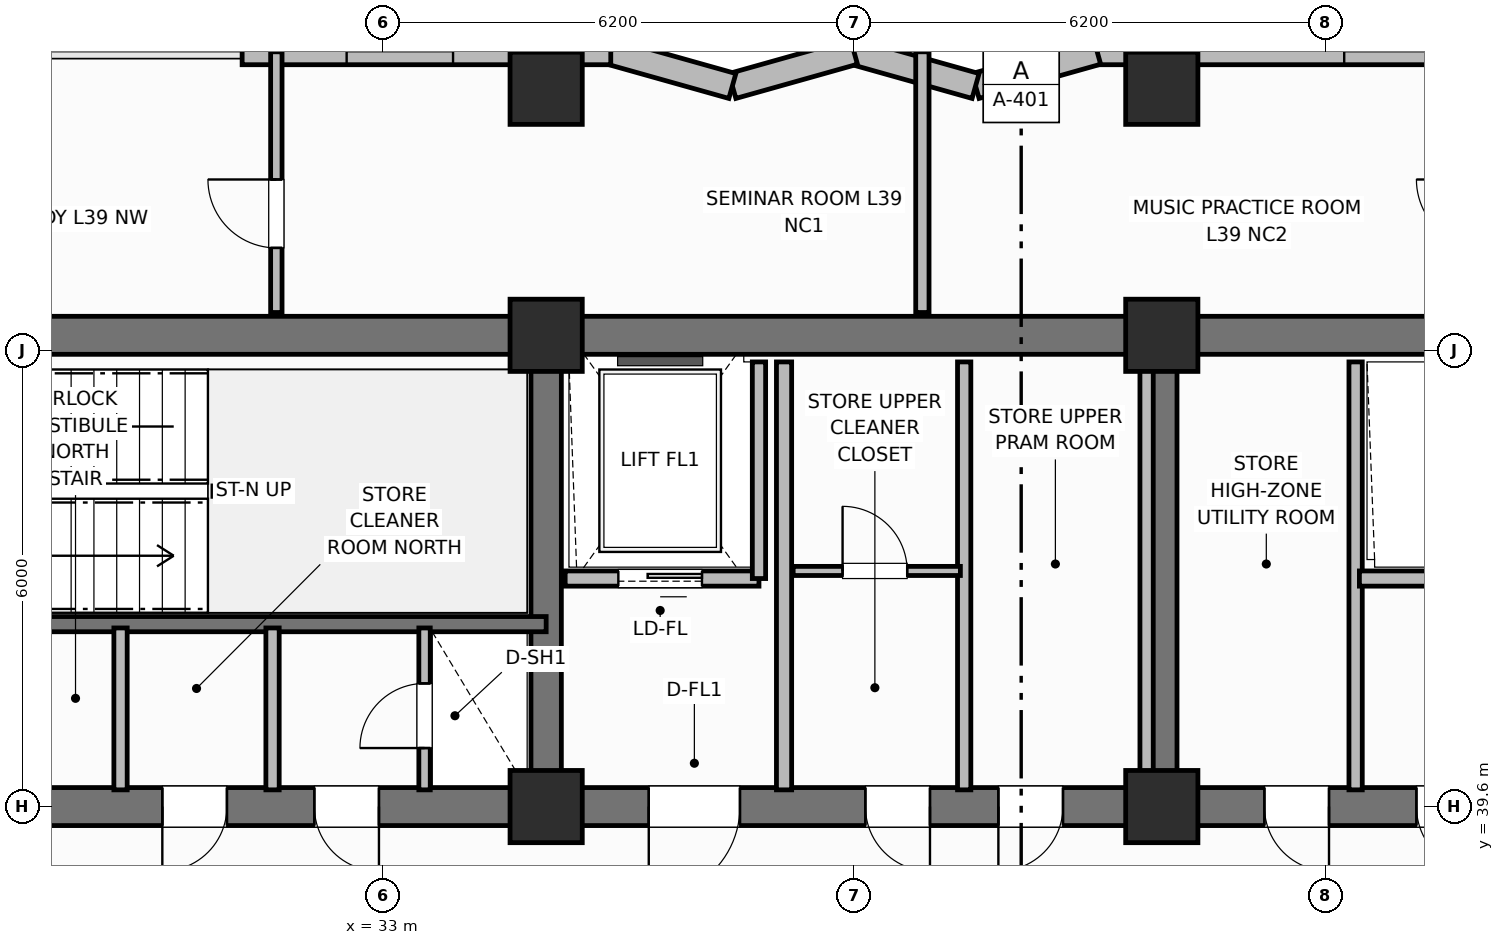
"""IFC4 building model, lengths in metres.
Left out: names, types, materials, properties, quantities, classifications, styles, units other than length and angle.
Written with IfcOpenShell. Run it as: python <this file> out.ifc"""

import sys

from ifc_helpers import new_model, si_unit, direction, frame, frame_2d, origin, origin_2d, place, context, subcontext, project, spatial, rectangle, extrude, element, fill, save


model = new_model("IFC4")
c1 = context("Model", 3, precision=1e-05, world=origin(), true_north=direction((0.0, 1.0)))
c2 = subcontext(c1, "Body", "Model", "MODEL_VIEW")
j1 = project(units=[si_unit("LENGTHUNIT", "METRE"), si_unit("PLANEANGLEUNIT", "RADIAN")], contexts=[c1])
p1 = place(None, origin())
s1 = spatial("IfcSite", under=j1, at=p1, CompositionType="ELEMENT")
p2 = place(p1, origin())
s2 = spatial("IfcBuilding", under=s1, at=p2, CompositionType="ELEMENT")
p3 = place(p2, frame((0.0, 0.0, 158.9)))
s3 = spatial("IfcBuildingStorey", under=s2, at=p3, CompositionType="ELEMENT", Elevation=158.9)
p4 = place(p3, frame((25.6, 45.8, 0.0), z_axis=(0.0, 0.0, 1.0), x_axis=(1.0, 0.0, 0.0)))
e1 = element("IfcWall", 1, at=p4, inside=s3, PredefinedType="SHEAR", context=c2, shape_type="SweptSolid", body=[
    extrude(rectangle(XDim=27.2, YDim=0.5, at=frame_2d((13.6, 0.0))), origin(), (0.0, 0.0, 1.0), 3.7),
])
p5 = place(p3, frame((52.8, 39.6, 0.0), z_axis=(0.0, 0.0, 1.0), x_axis=(-1.0, 0.0, 0.0)))
e2 = element("IfcWall", 2, at=p5, inside=s3, PredefinedType="SHEAR", context=c2, shape_type="SweptSolid", body=[
    extrude(rectangle(XDim=27.2, YDim=0.5, at=frame_2d((13.6, 0.0))), origin(), (0.0, 0.0, 1.0), 3.7),
])
p6 = place(p5, frame((24.3, 0.0, 0.0)))
e3 = element("IfcOpeningElement", 3, at=p6, cuts=e2, PredefinedType="OPENING", context=c2, shape_type="SweptSolid", body=[
    extrude(rectangle(XDim=1.1, YDim=2.15, at=frame_2d((0.55, 1.075))), frame((0.0, 0.26, 0.0), z_axis=(0.0, -1.0, 0.0), x_axis=(1.0, 0.0, 0.0)), (0.0, 0.0, 1.0), 0.52),
])
p7 = place(p5, frame((21.85, 0.0, 0.0)))
e4 = element("IfcOpeningElement", 4, at=p7, cuts=e2, PredefinedType="OPENING", context=c2, shape_type="SweptSolid", body=[
    extrude(rectangle(XDim=0.85, YDim=2.1, at=frame_2d((0.425, 1.05))), frame((0.0, 0.26, 0.0), z_axis=(0.0, -1.0, 0.0), x_axis=(1.0, 0.0, 0.0)), (0.0, 0.0, 1.0), 0.52),
])
p8 = place(p5, frame((19.85, 0.0, 0.0)))
e5 = element("IfcOpeningElement", 5, at=p8, cuts=e2, PredefinedType="OPENING", context=c2, shape_type="SweptSolid", body=[
    extrude(rectangle(XDim=0.85, YDim=2.1, at=frame_2d((0.425, 1.05))), frame((0.0, 0.26, 0.0), z_axis=(0.0, -1.0, 0.0), x_axis=(1.0, 0.0, 0.0)), (0.0, 0.0, 1.0), 0.52),
])
p9 = place(p5, frame((15.1, 0.0, 0.0)))
e6 = element("IfcOpeningElement", 6, at=p9, cuts=e2, PredefinedType="OPENING", context=c2, shape_type="SweptSolid", body=[
    extrude(rectangle(XDim=1.2, YDim=2.15, at=frame_2d((0.6, 1.075))), frame((0.0, 0.26, 0.0), z_axis=(0.0, -1.0, 0.0), x_axis=(1.0, 0.0, 0.0)), (0.0, 0.0, 1.0), 0.52),
])
p10 = place(p5, frame((12.6, 0.0, 0.0)))
e7 = element("IfcOpeningElement", 7, at=p10, cuts=e2, PredefinedType="OPENING", context=c2, shape_type="SweptSolid", body=[
    extrude(rectangle(XDim=0.85, YDim=2.1, at=frame_2d((0.425, 1.05))), frame((0.0, 0.26, 0.0), z_axis=(0.0, -1.0, 0.0), x_axis=(1.0, 0.0, 0.0)), (0.0, 0.0, 1.0), 0.52),
])
p11 = place(p5, frame((10.85, 0.0, 0.0)))
e8 = element("IfcOpeningElement", 8, at=p11, cuts=e2, PredefinedType="OPENING", context=c2, shape_type="SweptSolid", body=[
    extrude(rectangle(XDim=0.85, YDim=2.1, at=frame_2d((0.425, 1.05))), frame((0.0, 0.26, 0.0), z_axis=(0.0, -1.0, 0.0), x_axis=(1.0, 0.0, 0.0)), (0.0, 0.0, 1.0), 0.52),
])
p12 = place(p5, frame((7.35, 0.0, 0.0)))
e9 = element("IfcOpeningElement", 9, at=p12, cuts=e2, PredefinedType="OPENING", context=c2, shape_type="SweptSolid", body=[
    extrude(rectangle(XDim=0.85, YDim=2.1, at=frame_2d((0.425, 1.05))), frame((0.0, 0.26, 0.0), z_axis=(0.0, -1.0, 0.0), x_axis=(1.0, 0.0, 0.0)), (0.0, 0.0, 1.0), 0.52),
])
p13 = place(p5, frame((5.35, 0.0, 0.0)))
e10 = element("IfcOpeningElement", 10, at=p13, cuts=e2, PredefinedType="OPENING", context=c2, shape_type="SweptSolid", body=[
    extrude(rectangle(XDim=0.85, YDim=2.1, at=frame_2d((0.425, 1.05))), frame((0.0, 0.26, 0.0), z_axis=(0.0, -1.0, 0.0), x_axis=(1.0, 0.0, 0.0)), (0.0, 0.0, 1.0), 0.52),
])
p14 = place(p5, frame((2.0, 0.0, 0.0)))
e11 = element("IfcOpeningElement", 11, at=p14, cuts=e2, PredefinedType="OPENING", context=c2, shape_type="SweptSolid", body=[
    extrude(rectangle(XDim=0.85, YDim=2.1, at=frame_2d((0.425, 1.05))), frame((0.0, 0.26, 0.0), z_axis=(0.0, -1.0, 0.0), x_axis=(1.0, 0.0, 0.0)), (0.0, 0.0, 1.0), 0.52),
])
for number, where, z_axis, x_axis in (
    (12, (35.15, 39.85, 0.0), (0.0, 0.0, 1.0), (0.0, 1.0, 0.0)),
    (13, (43.25, 39.85, 0.0), (0.0, 0.0, 1.0), (0.0, 1.0, 0.0)),
):
    element("IfcWall", number, at=place(p3, frame(where, z_axis=z_axis, x_axis=x_axis)), inside=s3, PredefinedType="SHEAR", context=c2, shape_type="SweptSolid", body=[
        extrude(rectangle(XDim=5.7, YDim=0.4, at=frame_2d((2.85, 0.0))), origin(), (0.0, 0.0, 1.0), 3.7),
    ])
for number, where, z_axis, x_axis in (
    (14, (35.15, 39.6, 0.0), (0.0, 0.0, 1.0), (1.0, 0.0, 0.0)),
    (15, (35.15, 45.8, 0.0), (0.0, 0.0, 1.0), (1.0, 0.0, 0.0)),
    (16, (43.25, 39.6, 0.0), (0.0, 0.0, 1.0), (1.0, 0.0, 0.0)),
    (17, (43.25, 45.8, 0.0), (0.0, 0.0, 1.0), (1.0, 0.0, 0.0)),
    (18, (35.15, 49.05, 0.0), (0.0, 0.0, 1.0), (1.0, 0.0, 0.0)),
    (19, (43.25, 49.05, 0.0), (0.0, 0.0, 1.0), (1.0, 0.0, 0.0)),
):
    element("IfcColumn", number, at=place(p3, frame(where, z_axis=z_axis, x_axis=x_axis)), inside=s3, PredefinedType="COLUMN", context=c2, shape_type="SweptSolid", body=[
        extrude(rectangle(XDim=0.95, YDim=0.95, at=origin_2d()), origin(), (0.0, 0.0, 1.0), 3.7),
    ])
p15 = place(p3, frame((58.2, 49.53, 0.0), z_axis=(0.0, 0.0, 1.0), x_axis=(-1.0, 0.0, 0.0)))
e20 = element("IfcWall", 20, at=p15, inside=s3, PredefinedType="SOLIDWALL", context=c2, shape_type="SweptSolid", body=[
    extrude(rectangle(XDim=15.8, YDim=0.34, at=frame_2d((7.9, 0.0))), origin(), (0.0, 0.0, 1.0), 2.72),
])
p16 = place(p15, frame((1.4, 0.0, 0.75)))
e21 = element("IfcOpeningElement", 21, at=p16, cuts=e20, PredefinedType="OPENING", context=c2, shape_type="SweptSolid", body=[
    extrude(rectangle(XDim=1.4, YDim=1.85, at=frame_2d((0.7, 0.925))), frame((0.0, 0.18, 0.0), z_axis=(0.0, -1.0, 0.0), x_axis=(1.0, 0.0, 0.0)), (0.0, 0.0, 1.0), 0.36),
])
p17 = place(p15, frame((7.2, 0.0, 0.75)))
e22 = element("IfcOpeningElement", 22, at=p17, cuts=e20, PredefinedType="OPENING", context=c2, shape_type="SweptSolid", body=[
    extrude(rectangle(XDim=1.4, YDim=1.85, at=frame_2d((0.7, 0.925))), frame((0.0, 0.18, 0.0), z_axis=(0.0, -1.0, 0.0), x_axis=(1.0, 0.0, 0.0)), (0.0, 0.0, 1.0), 0.36),
])
p18 = place(p15, frame((11.15, 0.0, 0.75)))
e23 = element("IfcOpeningElement", 23, at=p18, cuts=e20, PredefinedType="OPENING", context=c2, shape_type="SweptSolid", body=[
    extrude(rectangle(XDim=1.4, YDim=1.85, at=frame_2d((0.7, 0.925))), frame((0.0, 0.18, 0.0), z_axis=(0.0, -1.0, 0.0), x_axis=(1.0, 0.0, 0.0)), (0.0, 0.0, 1.0), 0.36),
])
p19 = place(p3, frame((42.4, 49.53, 0.0), z_axis=(0.0, 0.0, 1.0), x_axis=(-0.962652136636, -0.270741322725, 0.0)))
e24 = element("IfcWall", 24, at=p19, inside=s3, PredefinedType="SOLIDWALL", context=c2, shape_type="SweptSolid", body=[
    extrude(rectangle(XDim=1.662, YDim=0.34, at=frame_2d((0.831, 0.0))), origin(), (0.0, 0.0, 1.0), 2.72),
])
p20 = place(p3, frame((40.8, 49.08, 0.0), z_axis=(0.0, 0.0, 1.0), x_axis=(-0.962662902433, 0.270703040766, 0.0)))
e25 = element("IfcWall", 25, at=p20, inside=s3, PredefinedType="SOLIDWALL", context=c2, shape_type="SweptSolid", body=[
    extrude(rectangle(XDim=1.662, YDim=0.34, at=frame_2d((0.831, 0.0))), origin(), (0.0, 0.0, 1.0), 2.72),
])
p21 = place(p3, frame((39.2, 49.53, 0.0), z_axis=(0.0, 0.0, 1.0), x_axis=(-0.962652136636, -0.270741322725, 0.0)))
e26 = element("IfcWall", 26, at=p21, inside=s3, PredefinedType="SOLIDWALL", context=c2, shape_type="SweptSolid", body=[
    extrude(rectangle(XDim=1.662, YDim=0.34, at=frame_2d((0.831, 0.0))), origin(), (0.0, 0.0, 1.0), 2.72),
])
p22 = place(p3, frame((37.6, 49.08, 0.0), z_axis=(0.0, 0.0, 1.0), x_axis=(-0.962662902433, 0.270703040766, 0.0)))
e27 = element("IfcWall", 27, at=p22, inside=s3, PredefinedType="SOLIDWALL", context=c2, shape_type="SweptSolid", body=[
    extrude(rectangle(XDim=1.662, YDim=0.34, at=frame_2d((0.831, 0.0))), origin(), (0.0, 0.0, 1.0), 2.72),
])
p23 = place(p3, frame((36.0, 49.53, 0.0), z_axis=(0.0, 0.0, 1.0), x_axis=(-1.0, 0.0, 0.0)))
e28 = element("IfcWall", 28, at=p23, inside=s3, PredefinedType="SOLIDWALL", context=c2, shape_type="SweptSolid", body=[
    extrude(rectangle(XDim=4.85, YDim=0.34, at=frame_2d((2.425, 0.0))), origin(), (0.0, 0.0, 1.0), 2.72),
])
p24 = place(p23, frame((2.075, 0.0, 0.75)))
e29 = element("IfcOpeningElement", 29, at=p24, cuts=e28, PredefinedType="OPENING", context=c2, shape_type="SweptSolid", body=[
    extrude(rectangle(XDim=1.4, YDim=1.85, at=frame_2d((0.7, 0.925))), frame((0.0, 0.18, 0.0), z_axis=(0.0, -1.0, 0.0), x_axis=(1.0, 0.0, 0.0)), (0.0, 0.0, 1.0), 0.36),
])
p25 = place(p3, frame((35.15, 42.0, 0.0), z_axis=(0.0, 0.0, 1.0), x_axis=(-1.0, 0.0, 0.0)))
e30 = element("IfcWall", 30, at=p25, inside=s3, PredefinedType="SHEAR", context=c2, shape_type="SweptSolid", body=[
    extrude(rectangle(XDim=9.55, YDim=0.2, at=frame_2d((4.775, 0.0))), origin(), (0.0, 0.0, 1.0), 3.7),
])
p26 = place(p25, frame((7.25, 0.0, 0.0)))
e31 = element("IfcOpeningElement", 31, at=p26, cuts=e30, PredefinedType="OPENING", context=c2, shape_type="SweptSolid", body=[
    extrude(rectangle(XDim=1.1, YDim=2.15, at=frame_2d((0.55, 1.075))), frame((0.0, 0.11, 0.0), z_axis=(0.0, -1.0, 0.0), x_axis=(1.0, 0.0, 0.0)), (0.0, 0.0, 1.0), 0.22),
])
p27 = place(p3, frame((33.55, 39.82, 0.0), z_axis=(0.0, 0.0, 1.0), x_axis=(0.0, 1.0, 0.0)))
e32 = element("IfcWall", 32, at=p27, inside=s3, PredefinedType="PARTITIONING", context=c2, shape_type="SweptSolid", body=[
    extrude(rectangle(XDim=2.13, YDim=0.15, at=frame_2d((1.065, 0.0))), origin(), (0.0, 0.0, 1.0), 2.55),
])
p28 = place(p27, frame((0.55, 0.0, 0.0)))
e33 = element("IfcOpeningElement", 33, at=p28, cuts=e32, PredefinedType="OPENING", context=c2, shape_type="SweptSolid", body=[
    extrude(rectangle(XDim=0.85, YDim=2.05, at=frame_2d((0.425, 1.025))), frame((0.0, 0.085, 0.0), z_axis=(0.0, -1.0, 0.0), x_axis=(1.0, 0.0, 0.0)), (0.0, 0.0, 1.0), 0.17),
])
for number, where, z_axis, x_axis in (
    (34, (29.55, 39.82, 0.0), (0.0, 0.0, 1.0), (0.0, 1.0, 0.0)),
    (35, (31.55, 39.82, 0.0), (0.0, 0.0, 1.0), (0.0, 1.0, 0.0)),
):
    element("IfcWall", number, at=place(p3, frame(where, z_axis=z_axis, x_axis=x_axis)), inside=s3, PredefinedType="PARTITIONING", context=c2, shape_type="SweptSolid", body=[
        extrude(rectangle(XDim=2.13, YDim=0.175, at=frame_2d((1.065, 0.0))), origin(), (0.0, 0.0, 1.0), 2.55),
    ])
p29 = place(p3, frame((37.95, 42.6, 0.0), z_axis=(0.0, 0.0, 1.0), x_axis=(-1.0, 0.0, 0.0)))
e36 = element("IfcWall", 36, at=p29, inside=s3, PredefinedType="PARTITIONING", context=c2, shape_type="SweptSolid", body=[
    extrude(rectangle(XDim=2.55, YDim=0.2, at=frame_2d((1.275, 0.0))), origin(), (0.0, 0.0, 1.0), 2.32),
])
p30 = place(p29, frame((0.75, 0.0, 0.0)))
e37 = element("IfcOpeningElement", 37, at=p30, cuts=e36, PredefinedType="OPENING", context=c2, shape_type="SweptSolid", body=[
    extrude(rectangle(XDim=1.1, YDim=2.15, at=frame_2d((0.55, 1.075))), frame((0.0, 0.11, 0.0), z_axis=(0.0, -1.0, 0.0), x_axis=(1.0, 0.0, 0.0)), (0.0, 0.0, 1.0), 0.22),
])
p31 = place(p3, frame((37.95, 42.6, 0.0), z_axis=(0.0, 0.0, 1.0), x_axis=(0.0, 1.0, 0.0)))
e38 = element("IfcWall", 38, at=p31, inside=s3, PredefinedType="PARTITIONING", context=c2, shape_type="SweptSolid", body=[
    extrude(rectangle(XDim=2.85, YDim=0.175, at=frame_2d((1.425, 0.0))), origin(), (0.0, 0.0, 1.0), 2.55),
])
p32 = place(p3, frame((38.28, 39.82, 0.0), z_axis=(0.0, 0.0, 1.0), x_axis=(0.0, 1.0, 0.0)))
e39 = element("IfcWall", 39, at=p32, inside=s3, PredefinedType="PARTITIONING", context=c2, shape_type="SweptSolid", body=[
    extrude(rectangle(XDim=5.63, YDim=0.2, at=frame_2d((2.815, 0.0))), origin(), (0.0, 0.0, 1.0), 2.55),
])
for number, where, z_axis, x_axis in (
    (40, (43.05, 39.82, 0.0), (0.0, 0.0, 1.0), (0.0, 1.0, 0.0)),
    (41, (40.65, 39.82, 0.0), (0.0, 0.0, 1.0), (0.0, 1.0, 0.0)),
):
    element("IfcWall", number, at=place(p3, frame(where, z_axis=z_axis, x_axis=x_axis)), inside=s3, PredefinedType="PARTITIONING", context=c2, shape_type="SweptSolid", body=[
        extrude(rectangle(XDim=5.63, YDim=0.175, at=frame_2d((2.815, 0.0))), origin(), (0.0, 0.0, 1.0), 2.55),
    ])
p33 = place(p3, frame((38.4, 42.7, 0.0), z_axis=(0.0, 0.0, 1.0), x_axis=(1.0, 0.0, 0.0)))
e42 = element("IfcWall", 42, at=p33, inside=s3, PredefinedType="PARTITIONING", context=c2, shape_type="SweptSolid", body=[
    extrude(rectangle(XDim=2.2, YDim=0.12, at=frame_2d((1.1, 0.0))), origin(), (0.0, 0.0, 1.0), 2.32),
])
p34 = place(p33, frame((0.65, 0.0, 0.0)))
e43 = element("IfcOpeningElement", 43, at=p34, cuts=e42, PredefinedType="OPENING", context=c2, shape_type="SweptSolid", body=[
    extrude(rectangle(XDim=0.85, YDim=2.1, at=frame_2d((0.425, 1.05))), frame((0.0, 0.07, 0.0), z_axis=(0.0, -1.0, 0.0), x_axis=(1.0, 0.0, 0.0)), (0.0, 0.0, 1.0), 0.14),
])
p35 = place(p3, frame((45.8, 39.82, 0.0), z_axis=(0.0, 0.0, 1.0), x_axis=(0.0, 1.0, 0.0)))
e44 = element("IfcWall", 44, at=p35, inside=s3, PredefinedType="PARTITIONING", context=c2, shape_type="SweptSolid", body=[
    extrude(rectangle(XDim=5.63, YDim=0.175, at=frame_2d((2.815, 0.0))), origin(), (0.0, 0.0, 1.0), 2.55),
])
p36 = place(p3, frame((52.35, 42.6, 0.0), z_axis=(0.0, 0.0, 1.0), x_axis=(-1.0, 0.0, 0.0)))
e45 = element("IfcWall", 45, at=p36, inside=s3, PredefinedType="PARTITIONING", context=c2, shape_type="SweptSolid", body=[
    extrude(rectangle(XDim=6.5, YDim=0.2, at=frame_2d((3.25, 0.0))), origin(), (0.0, 0.0, 1.0), 2.55),
])
p37 = place(p3, frame((31.6, 46.1, 0.0), z_axis=(0.0, 0.0, 1.0), x_axis=(0.0, 1.0, 0.0)))
e46 = element("IfcWall", 46, at=p37, inside=s3, PredefinedType="PARTITIONING", context=c2, shape_type="SweptSolid", body=[
    extrude(rectangle(XDim=3.43, YDim=0.15, at=frame_2d((1.715, 0.0))), origin(), (0.0, 0.0, 1.0), 2.55),
])
p38 = place(p37, frame((0.85, 0.0, 0.0)))
e47 = element("IfcOpeningElement", 47, at=p38, cuts=e46, PredefinedType="OPENING", context=c2, shape_type="SweptSolid", body=[
    extrude(rectangle(XDim=0.9, YDim=2.1, at=frame_2d((0.45, 1.05))), frame((0.0, 0.085, 0.0), z_axis=(0.0, -1.0, 0.0), x_axis=(1.0, 0.0, 0.0)), (0.0, 0.0, 1.0), 0.17),
])
p39 = place(p3, frame((40.1, 46.1, 0.0), z_axis=(0.0, 0.0, 1.0), x_axis=(0.0, 1.0, 0.0)))
e48 = element("IfcWall", 48, at=p39, inside=s3, PredefinedType="PARTITIONING", context=c2, shape_type="SweptSolid", body=[
    extrude(rectangle(XDim=3.43, YDim=0.175, at=frame_2d((1.715, 0.0))), origin(), (0.0, 0.0, 1.0), 2.55),
])
p40 = place(p18, origin())
e49 = element("IfcWindow", 49, at=p40, inside=s3, PartitioningType="SINGLE_PANEL", PredefinedType="WINDOW", context=c2, shape_type="SweptSolid", body=[
    extrude(rectangle(XDim=1.4, YDim=1.85, at=frame_2d((0.7, 0.925))), frame((0.0, 0.03, 0.0), z_axis=(0.0, -1.0, 0.0), x_axis=(1.0, 0.0, 0.0)), (0.0, 0.0, 1.0), 0.06),
])
fill(e23, e49)
p41 = place(p24, origin())
e50 = element("IfcWindow", 50, at=p41, inside=s3, PartitioningType="SINGLE_PANEL", PredefinedType="WINDOW", context=c2, shape_type="SweptSolid", body=[
    extrude(rectangle(XDim=1.4, YDim=1.85, at=frame_2d((0.7, 0.925))), frame((0.0, 0.03, 0.0), z_axis=(0.0, -1.0, 0.0), x_axis=(1.0, 0.0, 0.0)), (0.0, 0.0, 1.0), 0.06),
])
fill(e29, e50)
p42 = place(p28, origin())
e51 = element("IfcDoor", 51, at=p42, inside=s3, OperationType="SINGLE_SWING_LEFT", PredefinedType="TRAPDOOR", context=c2, shape_type="SweptSolid", body=[
    extrude(rectangle(XDim=0.85, YDim=2.05, at=frame_2d((0.425, 1.025))), frame((0.0, 0.025, 0.0), z_axis=(0.0, -1.0, 0.0), x_axis=(1.0, 0.0, 0.0)), (0.0, 0.0, 1.0), 0.05),
])
fill(e33, e51)
p43 = place(p30, origin())
e52 = element("IfcDoor", 52, at=p43, inside=s3, OperationType="SLIDING_TO_LEFT", PredefinedType="DOOR", context=c2, shape_type="SweptSolid", body=[
    extrude(rectangle(XDim=1.1, YDim=2.15, at=frame_2d((0.55, 1.075))), frame((0.0, 0.025, 0.0), z_axis=(0.0, -1.0, 0.0), x_axis=(1.0, 0.0, 0.0)), (0.0, 0.0, 1.0), 0.05),
])
fill(e37, e52)
p44 = place(p34, origin())
e53 = element("IfcDoor", 53, at=p44, inside=s3, OperationType="SINGLE_SWING_LEFT", PredefinedType="DOOR", context=c2, shape_type="SweptSolid", body=[
    extrude(rectangle(XDim=0.85, YDim=2.1, at=frame_2d((0.425, 1.05))), frame((0.0, 0.025, 0.0), z_axis=(0.0, -1.0, 0.0), x_axis=(1.0, 0.0, 0.0)), (0.0, 0.0, 1.0), 0.05),
])
fill(e43, e53)
p45 = place(p38, origin())
e54 = element("IfcDoor", 54, at=p45, inside=s3, OperationType="SINGLE_SWING_RIGHT", PredefinedType="DOOR", context=c2, shape_type="SweptSolid", body=[
    extrude(rectangle(XDim=0.9, YDim=2.1, at=frame_2d((0.45, 1.05))), frame((0.0, 0.025, 0.0), z_axis=(0.0, -1.0, 0.0), x_axis=(1.0, 0.0, 0.0)), (0.0, 0.0, 1.0), 0.05),
])
fill(e47, e54)
p46 = place(p7, origin())
e55 = element("IfcDoor", 55, at=p46, inside=s3, OperationType="SINGLE_SWING_RIGHT", PredefinedType="DOOR", context=c2, shape_type="SweptSolid", body=[
    extrude(rectangle(XDim=0.85, YDim=2.1, at=frame_2d((0.425, 1.05))), frame((0.0, 0.025, 0.0), z_axis=(0.0, -1.0, 0.0), x_axis=(1.0, 0.0, 0.0)), (0.0, 0.0, 1.0), 0.05),
])
fill(e4, e55)
p47 = place(p8, origin())
e56 = element("IfcDoor", 56, at=p47, inside=s3, OperationType="SINGLE_SWING_LEFT", PredefinedType="DOOR", context=c2, shape_type="SweptSolid", body=[
    extrude(rectangle(XDim=0.85, YDim=2.1, at=frame_2d((0.425, 1.05))), frame((0.0, 0.025, 0.0), z_axis=(0.0, -1.0, 0.0), x_axis=(1.0, 0.0, 0.0)), (0.0, 0.0, 1.0), 0.05),
])
fill(e5, e56)
p48 = place(p9, origin())
e57 = element("IfcDoor", 57, at=p48, inside=s3, OperationType="SINGLE_SWING_RIGHT", PredefinedType="DOOR", context=c2, shape_type="SweptSolid", body=[
    extrude(rectangle(XDim=1.2, YDim=2.15, at=frame_2d((0.6, 1.075))), frame((0.0, 0.025, 0.0), z_axis=(0.0, -1.0, 0.0), x_axis=(1.0, 0.0, 0.0)), (0.0, 0.0, 1.0), 0.05),
])
fill(e6, e57)
p49 = place(p10, origin())
e58 = element("IfcDoor", 58, at=p49, inside=s3, OperationType="SINGLE_SWING_LEFT", PredefinedType="DOOR", context=c2, shape_type="SweptSolid", body=[
    extrude(rectangle(XDim=0.85, YDim=2.1, at=frame_2d((0.425, 1.05))), frame((0.0, 0.025, 0.0), z_axis=(0.0, -1.0, 0.0), x_axis=(1.0, 0.0, 0.0)), (0.0, 0.0, 1.0), 0.05),
])
fill(e7, e58)
p50 = place(p11, origin())
e59 = element("IfcDoor", 59, at=p50, inside=s3, OperationType="SINGLE_SWING_RIGHT", PredefinedType="DOOR", context=c2, shape_type="SweptSolid", body=[
    extrude(rectangle(XDim=0.85, YDim=2.1, at=frame_2d((0.425, 1.05))), frame((0.0, 0.025, 0.0), z_axis=(0.0, -1.0, 0.0), x_axis=(1.0, 0.0, 0.0)), (0.0, 0.0, 1.0), 0.05),
])
fill(e8, e59)
p51 = place(p12, origin())
e60 = element("IfcDoor", 60, at=p51, inside=s3, OperationType="SINGLE_SWING_LEFT", PredefinedType="DOOR", context=c2, shape_type="SweptSolid", body=[
    extrude(rectangle(XDim=0.85, YDim=2.1, at=frame_2d((0.425, 1.05))), frame((0.0, 0.025, 0.0), z_axis=(0.0, -1.0, 0.0), x_axis=(1.0, 0.0, 0.0)), (0.0, 0.0, 1.0), 0.05),
])
fill(e9, e60)
p52 = place(p13, origin())
e61 = element("IfcDoor", 61, at=p52, inside=s3, OperationType="SINGLE_SWING_LEFT", PredefinedType="DOOR", context=c2, shape_type="SweptSolid", body=[
    extrude(rectangle(XDim=0.85, YDim=2.1, at=frame_2d((0.425, 1.05))), frame((0.0, 0.025, 0.0), z_axis=(0.0, -1.0, 0.0), x_axis=(1.0, 0.0, 0.0)), (0.0, 0.0, 1.0), 0.05),
])
fill(e10, e61)
save(model, sys.argv[1])
